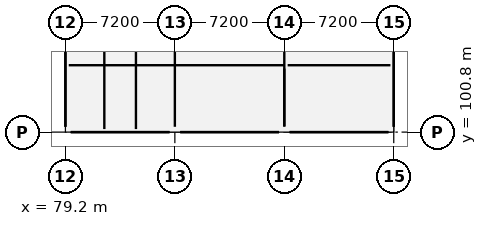
"""IFC4 building model, lengths in metres.
Left out: names, types, materials, properties, quantities, classifications, styles, units other than length and angle.
Written with IfcOpenShell. Run it as: python <this file> out.ifc"""

import sys

from ifc_helpers import new_model, si_unit, direction, frame, frame_2d, origin, origin_2d, place, context, subcontext, project, spatial, rectangle, extrude, element, fill, save


model = new_model("IFC4")
c1 = context("Model", 3, precision=1e-05, world=origin(), true_north=direction((0.0, 1.0)))
c2 = subcontext(c1, "Body", "Model", "MODEL_VIEW")
j1 = project(units=[si_unit("LENGTHUNIT", "METRE"), si_unit("PLANEANGLEUNIT", "RADIAN")], contexts=[c1])
p1 = place(None, origin())
s1 = spatial("IfcSite", under=j1, at=p1, CompositionType="ELEMENT")
p2 = place(p1, origin())
s2 = spatial("IfcBuilding", under=s1, at=p2, CompositionType="ELEMENT")
p3 = place(p2, frame((0.0, 0.0, 9.6)))
s3 = spatial("IfcBuildingStorey", under=s2, at=p3, CompositionType="ELEMENT", Elevation=9.6)
for number, where, z_axis, x_axis in (
    (1, (79.2, 100.8, 0.0), (0.0, 0.0, 1.0), (1.0, 0.0, 0.0)),
    (2, (86.4, 100.8, 0.0), (0.0, 0.0, 1.0), (1.0, 0.0, 0.0)),
    (3, (93.6, 100.8, 0.0), (0.0, 0.0, 1.0), (1.0, 0.0, 0.0)),
    (4, (100.8, 100.8, 0.0), (0.0, 0.0, 1.0), (1.0, 0.0, 0.0)),
):
    element("IfcColumn", number, at=place(p3, frame(where, z_axis=z_axis, x_axis=x_axis)), inside=s3, PredefinedType="COLUMN", context=c2, shape_type="SweptSolid", body=[
        extrude(rectangle(XDim=0.7, YDim=0.7, at=origin_2d()), origin(), (0.0, 0.0, 1.0), 3.9),
    ])
p4 = place(p3, frame((100.8, 101.15, 0.0), z_axis=(0.0, 0.0, 1.0), x_axis=(0.0, 1.0, 0.0)))
e5 = element("IfcWall", 5, at=p4, inside=s3, PredefinedType="ELEMENTEDWALL", context=c2, shape_type="SweptSolid", body=[
    extrude(rectangle(XDim=6.5, YDim=0.28, at=frame_2d((3.25, 0.0))), origin(), (0.0, 0.0, 1.0), 2.99),
])
p5 = place(p4, frame((2.8, 0.0, 0.8)))
e6 = element("IfcOpeningElement", 6, at=p5, cuts=e5, PredefinedType="OPENING", context=c2, shape_type="SweptSolid", body=[
    extrude(rectangle(XDim=0.9, YDim=2.0, at=frame_2d((0.45, 1.0))), frame((0.0, 0.152, 0.0), z_axis=(0.0, -1.0, 0.0), x_axis=(1.0, 0.0, 0.0)), (0.0, 0.0, 1.0), 0.304),
])
p6 = place(p3, frame((79.2, 107.65, 0.0), z_axis=(0.0, 0.0, 1.0), x_axis=(0.0, -1.0, 0.0)))
e7 = element("IfcWall", 7, at=p6, inside=s3, PredefinedType="ELEMENTEDWALL", context=c2, shape_type="SweptSolid", body=[
    extrude(rectangle(XDim=6.5, YDim=0.28, at=frame_2d((3.25, 0.0))), origin(), (0.0, 0.0, 1.0), 2.99),
])
p7 = place(p6, frame((2.6, 0.0, 0.85)))
e8 = element("IfcOpeningElement", 8, at=p7, cuts=e7, PredefinedType="OPENING", context=c2, shape_type="SweptSolid", body=[
    extrude(rectangle(XDim=1.3, YDim=1.85, at=frame_2d((0.65, 0.925))), frame((0.0, 0.152, 0.0), z_axis=(0.0, -1.0, 0.0), x_axis=(1.0, 0.0, 0.0)), (0.0, 0.0, 1.0), 0.304),
])
p8 = place(p3, frame((79.55, 100.8, 0.0), z_axis=(0.0, 0.0, 1.0), x_axis=(1.0, 0.0, 0.0)))
e9 = element("IfcWall", 9, at=p8, inside=s3, PredefinedType="ELEMENTEDWALL", context=c2, shape_type="SweptSolid", body=[
    extrude(rectangle(XDim=6.5, YDim=0.28, at=frame_2d((3.25, 0.0))), origin(), (0.0, 0.0, 1.0), 2.94),
])
p9 = place(p3, frame((86.75, 100.8, 0.0), z_axis=(0.0, 0.0, 1.0), x_axis=(1.0, 0.0, 0.0)))
e10 = element("IfcWall", 10, at=p9, inside=s3, PredefinedType="ELEMENTEDWALL", context=c2, shape_type="SweptSolid", body=[
    extrude(rectangle(XDim=6.5, YDim=0.28, at=frame_2d((3.25, 0.0))), origin(), (0.0, 0.0, 1.0), 2.89),
])
p10 = place(p3, frame((93.95, 100.8, 0.0), z_axis=(0.0, 0.0, 1.0), x_axis=(1.0, 0.0, 0.0)))
e11 = element("IfcWall", 11, at=p10, inside=s3, PredefinedType="ELEMENTEDWALL", context=c2, shape_type="SweptSolid", body=[
    extrude(rectangle(XDim=6.5, YDim=0.28, at=frame_2d((3.25, 0.0))), origin(), (0.0, 0.0, 1.0), 2.94),
])
p11 = place(p3, frame((79.42, 105.2, 0.0), z_axis=(0.0, 0.0, 1.0), x_axis=(1.0, 0.0, 0.0)))
e12 = element("IfcWall", 12, at=p11, inside=s3, PredefinedType="STANDARD", context=c2, shape_type="SweptSolid", body=[
    extrude(rectangle(XDim=14.18, YDim=0.15, at=frame_2d((7.09, 0.0))), origin(), (0.0, 0.0, 1.0), 2.988),
])
p12 = place(p11, frame((6.565, 0.0, 0.0)))
e13 = element("IfcOpeningElement", 13, at=p12, cuts=e12, PredefinedType="OPENING", context=c2, shape_type="SweptSolid", body=[
    extrude(rectangle(XDim=1.05, YDim=2.15, at=frame_2d((0.525, 1.075))), frame((0.0, 0.087, 0.0), z_axis=(0.0, -1.0, 0.0), x_axis=(1.0, 0.0, 0.0)), (0.0, 0.0, 1.0), 0.174),
])
p13 = place(p3, frame((93.6, 101.19, 0.0), z_axis=(0.0, 0.0, 1.0), x_axis=(0.0, 1.0, 0.0)))
e14 = element("IfcWall", 14, at=p13, inside=s3, PredefinedType="STANDARD", context=c2, shape_type="SweptSolid", body=[
    extrude(rectangle(XDim=3.79, YDim=0.15, at=frame_2d((1.895, 0.0))), origin(), (0.0, 0.0, 1.0), 2.988),
])
p14 = place(p3, frame((93.82, 105.2, 0.0), z_axis=(0.0, 0.0, 1.0), x_axis=(1.0, 0.0, 0.0)))
e15 = element("IfcWall", 15, at=p14, inside=s3, PredefinedType="PLUMBINGWALL", context=c2, shape_type="SweptSolid", body=[
    extrude(rectangle(XDim=6.76, YDim=0.18, at=frame_2d((3.38, 0.0))), origin(), (0.0, 0.0, 1.0), 3.62),
])
p15 = place(p14, frame((2.93, 0.0, 0.0)))
e16 = element("IfcOpeningElement", 16, at=p15, cuts=e15, PredefinedType="OPENING", context=c2, shape_type="SweptSolid", body=[
    extrude(rectangle(XDim=0.9, YDim=2.1, at=frame_2d((0.45, 1.05))), frame((0.0, 0.102, 0.0), z_axis=(0.0, -1.0, 0.0), x_axis=(1.0, 0.0, 0.0)), (0.0, 0.0, 1.0), 0.204),
])
p16 = place(p5, origin())
e17 = element("IfcWindow", 17, at=p16, inside=s3, PartitioningType="SINGLE_PANEL", PredefinedType="WINDOW", context=c2, shape_type="SweptSolid", body=[
    extrude(rectangle(XDim=0.9, YDim=2.0, at=frame_2d((0.45, 1.0))), frame((0.0, 0.03, 0.0), z_axis=(0.0, -1.0, 0.0), x_axis=(1.0, 0.0, 0.0)), (0.0, 0.0, 1.0), 0.06),
])
fill(e6, e17)
p17 = place(p7, origin())
e18 = element("IfcWindow", 18, at=p17, inside=s3, PartitioningType="SINGLE_PANEL", PredefinedType="WINDOW", context=c2, shape_type="SweptSolid", body=[
    extrude(rectangle(XDim=1.3, YDim=1.85, at=frame_2d((0.65, 0.925))), frame((0.0, 0.03, 0.0), z_axis=(0.0, -1.0, 0.0), x_axis=(1.0, 0.0, 0.0)), (0.0, 0.0, 1.0), 0.06),
])
fill(e8, e18)
p18 = place(p12, origin())
e19 = element("IfcDoor", 19, at=p18, inside=s3, OperationType="SINGLE_SWING_RIGHT", PredefinedType="DOOR", context=c2, shape_type="SweptSolid", body=[
    extrude(rectangle(XDim=1.05, YDim=2.15, at=frame_2d((0.525, 1.075))), frame((0.0, 0.025, 0.0), z_axis=(0.0, -1.0, 0.0), x_axis=(1.0, 0.0, 0.0)), (0.0, 0.0, 1.0), 0.05),
])
fill(e13, e19)
p19 = place(p15, origin())
e20 = element("IfcDoor", 20, at=p19, inside=s3, OperationType="SINGLE_SWING_LEFT", PredefinedType="DOOR", context=c2, shape_type="SweptSolid", body=[
    extrude(rectangle(XDim=0.9, YDim=2.1, at=frame_2d((0.45, 1.05))), frame((0.0, 0.025, 0.0), z_axis=(0.0, -1.0, 0.0), x_axis=(1.0, 0.0, 0.0)), (0.0, 0.0, 1.0), 0.05),
])
fill(e16, e20)
save(model, sys.argv[1])
